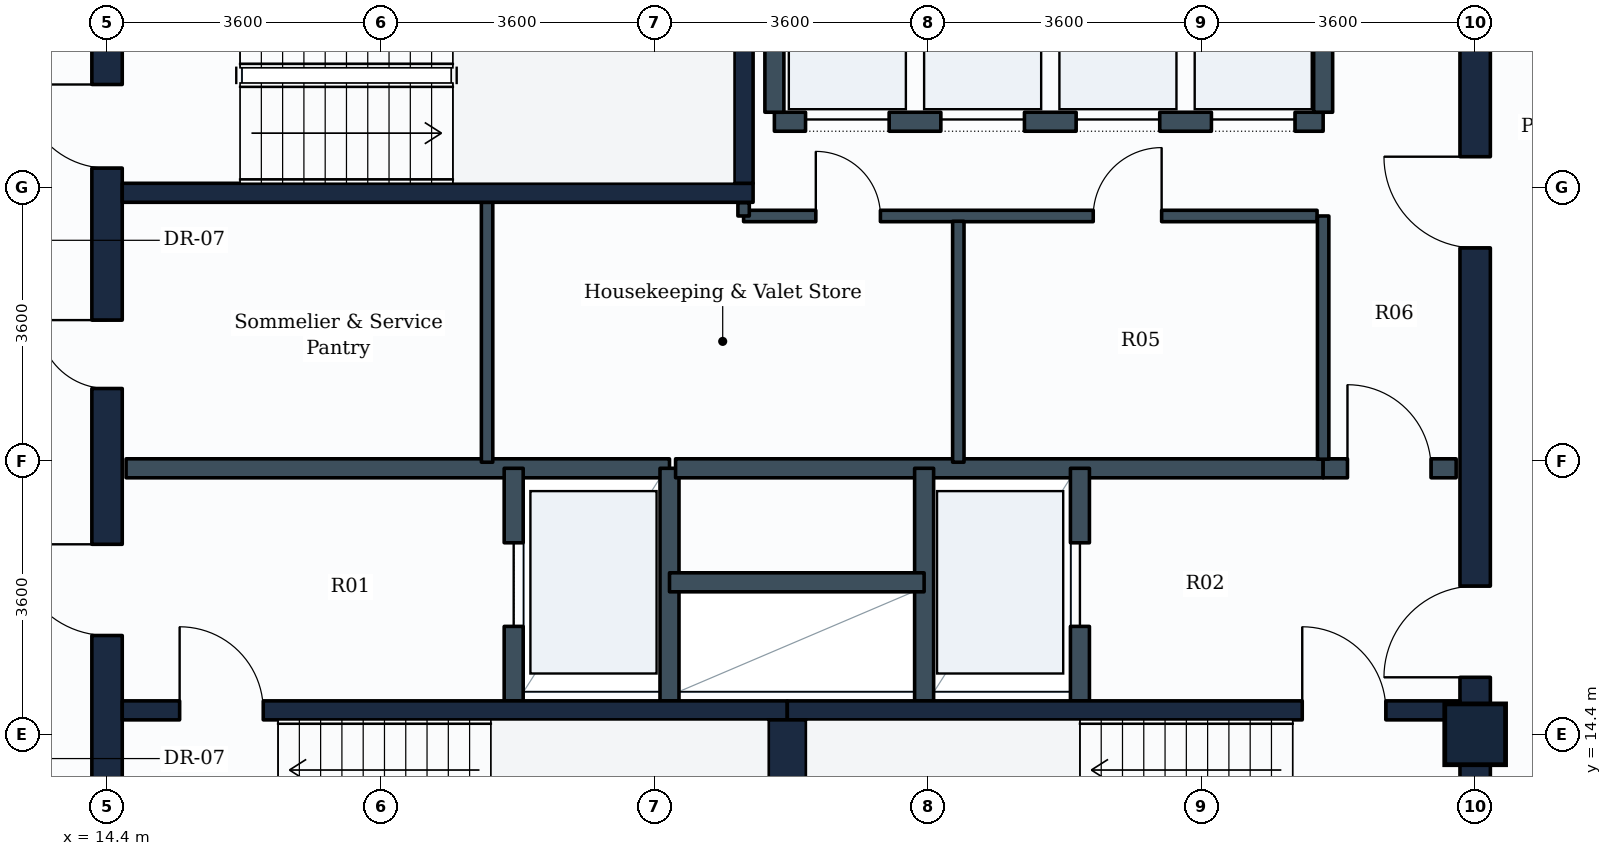
"""IFC4 building model, lengths in metres.
Left out: names, types, materials, properties, quantities, classifications, styles, units other than length and angle.
Written with IfcOpenShell. Run it as: python <this file> out.ifc"""

import sys

from ifc_helpers import new_model, si_unit, direction, frame, frame_2d, origin, origin_2d, place, context, subcontext, project, spatial, rectangle, extrude, element, fill, save


model = new_model("IFC4")
c1 = context("Model", 3, precision=1e-05, world=origin(), true_north=direction((0.0, 1.0)))
c2 = subcontext(c1, "Body", "Model", "MODEL_VIEW")
j1 = project(units=[si_unit("LENGTHUNIT", "METRE"), si_unit("PLANEANGLEUNIT", "RADIAN")], contexts=[c1])
p1 = place(None, origin())
s1 = spatial("IfcSite", under=j1, at=p1, CompositionType="ELEMENT")
p2 = place(p1, origin())
s2 = spatial("IfcBuilding", under=s1, at=p2, CompositionType="ELEMENT")
p3 = place(p2, frame((0.0, 0.0, 270.2)))
s3 = spatial("IfcBuildingStorey", under=s2, at=p3, CompositionType="ELEMENT", Elevation=270.2)
p4 = place(p3, frame((32.4, 14.4, 0.0), z_axis=(0.0, 0.0, 1.0), x_axis=(1.0, 0.0, 0.0)))
e1 = element("IfcColumn", 1, at=p4, inside=s3, PredefinedType="COLUMN", context=c2, shape_type="SweptSolid", body=[
    extrude(rectangle(XDim=0.8, YDim=0.8, at=origin_2d()), origin(), (0.0, 0.0, 1.0), 3.6),
])
p5 = place(p3, frame((14.4, 10.8, 0.0), z_axis=(0.0, 0.0, 1.0), x_axis=(0.0, 1.0, 0.0)))
e2 = element("IfcWall", 2, at=p5, inside=s3, PredefinedType="SHEAR", context=c2, shape_type="SweptSolid", body=[
    extrude(rectangle(XDim=14.4, YDim=0.4, at=frame_2d((7.2, 0.0))), origin(), (0.0, 0.0, 1.0), 3.35),
])
p6 = place(p5, frame((11.05, 0.0, 0.0)))
e3 = element("IfcOpeningElement", 3, at=p6, cuts=e2, PredefinedType="OPENING", context=c2, shape_type="SweptSolid", body=[
    extrude(rectangle(XDim=1.1, YDim=2.1, at=frame_2d((0.55, 1.05))), frame((0.0, 0.21, 0.0), z_axis=(0.0, -1.0, 0.0), x_axis=(1.0, 0.0, 0.0)), (0.0, 0.0, 1.0), 0.42),
])
p7 = place(p5, frame((4.9, 0.0, 0.0)))
e4 = element("IfcOpeningElement", 4, at=p7, cuts=e2, PredefinedType="OPENING", context=c2, shape_type="SweptSolid", body=[
    extrude(rectangle(XDim=1.2, YDim=2.1, at=frame_2d((0.6, 1.05))), frame((0.0, 0.21, 0.0), z_axis=(0.0, -1.0, 0.0), x_axis=(1.0, 0.0, 0.0)), (0.0, 0.0, 1.0), 0.42),
])
p8 = place(p5, frame((8.15, 0.0, 0.0)))
e5 = element("IfcOpeningElement", 5, at=p8, cuts=e2, PredefinedType="OPENING", context=c2, shape_type="SweptSolid", body=[
    extrude(rectangle(XDim=0.9, YDim=2.1, at=frame_2d((0.45, 1.05))), frame((0.0, 0.21, 0.0), z_axis=(0.0, -1.0, 0.0), x_axis=(1.0, 0.0, 0.0)), (0.0, 0.0, 1.0), 0.42),
])
p9 = place(p3, frame((32.4, 10.8, 0.0), z_axis=(0.0, 0.0, 1.0), x_axis=(0.0, 1.0, 0.0)))
e6 = element("IfcWall", 6, at=p9, inside=s3, PredefinedType="SHEAR", context=c2, shape_type="SweptSolid", body=[
    extrude(rectangle(XDim=14.4, YDim=0.4, at=frame_2d((7.2, 0.0))), origin(), (0.0, 0.0, 1.0), 3.35),
])
p10 = place(p9, frame((4.35, 0.0, 0.0)))
e7 = element("IfcOpeningElement", 7, at=p10, cuts=e6, PredefinedType="OPENING", context=c2, shape_type="SweptSolid", body=[
    extrude(rectangle(XDim=1.2, YDim=2.1, at=frame_2d((0.6, 1.05))), frame((0.0, 0.21, 0.0), z_axis=(0.0, -1.0, 0.0), x_axis=(1.0, 0.0, 0.0)), (0.0, 0.0, 1.0), 0.42),
])
p11 = place(p9, frame((10.0, 0.0, 0.0)))
e8 = element("IfcOpeningElement", 8, at=p11, cuts=e6, PredefinedType="OPENING", context=c2, shape_type="SweptSolid", body=[
    extrude(rectangle(XDim=1.2, YDim=2.1, at=frame_2d((0.6, 1.05))), frame((0.0, 0.21, 0.0), z_axis=(0.0, -1.0, 0.0), x_axis=(1.0, 0.0, 0.0)), (0.0, 0.0, 1.0), 0.42),
])
p12 = place(p3, frame((14.6, 14.715, 0.0), z_axis=(0.0, 0.0, 1.0), x_axis=(1.0, 0.0, 0.0)))
e9 = element("IfcWall", 9, at=p12, inside=s3, PredefinedType="SHEAR", context=c2, shape_type="SweptSolid", body=[
    extrude(rectangle(XDim=8.75, YDim=0.25, at=frame_2d((4.375, 0.0))), origin(), (0.0, 0.0, 1.0), 3.35),
])
p13 = place(p12, frame((0.755, 0.0, 0.0)))
e10 = element("IfcOpeningElement", 10, at=p13, cuts=e9, PredefinedType="OPENING", context=c2, shape_type="SweptSolid", body=[
    extrude(rectangle(XDim=1.1, YDim=2.1, at=frame_2d((0.55, 1.05))), frame((0.0, 0.135, 0.0), z_axis=(0.0, -1.0, 0.0), x_axis=(1.0, 0.0, 0.0)), (0.0, 0.0, 1.0), 0.27),
])
p14 = place(p3, frame((23.35, 14.715, 0.0), z_axis=(0.0, 0.0, 1.0), x_axis=(1.0, 0.0, 0.0)))
e11 = element("IfcWall", 11, at=p14, inside=s3, PredefinedType="SHEAR", context=c2, shape_type="SweptSolid", body=[
    extrude(rectangle(XDim=8.85, YDim=0.25, at=frame_2d((4.425, 0.0))), origin(), (0.0, 0.0, 1.0), 3.35),
])
p15 = place(p14, frame((6.775, 0.0, 0.0)))
e12 = element("IfcOpeningElement", 12, at=p15, cuts=e11, PredefinedType="OPENING", context=c2, shape_type="SweptSolid", body=[
    extrude(rectangle(XDim=1.1, YDim=2.1, at=frame_2d((0.55, 1.05))), frame((0.0, 0.135, 0.0), z_axis=(0.0, -1.0, 0.0), x_axis=(1.0, 0.0, 0.0)), (0.0, 0.0, 1.0), 0.27),
])
p16 = place(p3, frame((23.35, 11.75, 0.0), z_axis=(0.0, 0.0, 1.0), x_axis=(0.0, 1.0, 0.0)))
e13 = element("IfcWall", 13, at=p16, inside=s3, PredefinedType="SHEAR", context=c2, shape_type="SweptSolid", body=[
    extrude(rectangle(XDim=2.84, YDim=0.5, at=frame_2d((1.42, 0.0))), origin(), (0.0, 0.0, 1.0), 3.35),
])
p17 = place(p3, frame((14.6, 21.525, 0.0), z_axis=(0.0, 0.0, 1.0), x_axis=(1.0, 0.0, 0.0)))
e14 = element("IfcWall", 14, at=p17, inside=s3, PredefinedType="SHEAR", context=c2, shape_type="SweptSolid", body=[
    extrude(rectangle(XDim=8.3, YDim=0.25, at=frame_2d((4.15, 0.0))), origin(), (0.0, 0.0, 1.0), 3.35),
])
p18 = place(p3, frame((22.775, 21.65, 0.0), z_axis=(0.0, 0.0, 1.0), x_axis=(0.0, 1.0, 0.0)))
e15 = element("IfcWall", 15, at=p18, inside=s3, PredefinedType="SHEAR", context=c2, shape_type="SweptSolid", body=[
    extrude(rectangle(XDim=2.84, YDim=0.25, at=frame_2d((1.42, 0.0))), origin(), (0.0, 0.0, 1.0), 3.35),
])
p19 = place(p3, frame((14.65, 17.9, 0.0), z_axis=(0.0, 0.0, 1.0), x_axis=(1.0, 0.0, 0.0)))
e16 = element("IfcWall", 16, at=p19, inside=s3, PredefinedType="PARTITIONING", context=c2, shape_type="SweptSolid", body=[
    extrude(rectangle(XDim=7.15, YDim=0.25, at=frame_2d((3.575, 0.0))), origin(), (0.0, 0.0, 1.0), 3.335),
])
p20 = place(p3, frame((19.75, 14.84, 0.0), z_axis=(0.0, 0.0, 1.0), x_axis=(0.0, 1.0, 0.0)))
e17 = element("IfcWall", 17, at=p20, inside=s3, PredefinedType="PARTITIONING", context=c2, shape_type="SweptSolid", body=[
    extrude(rectangle(XDim=3.06, YDim=0.25, at=frame_2d((1.53, 0.0))), origin(), (0.0, 0.0, 1.0), 3.335),
])
p21 = place(p20, frame((0.98, 0.0, 0.0)))
e18 = element("IfcOpeningElement", 18, at=p21, cuts=e17, PredefinedType="OPENING", context=c2, shape_type="SweptSolid", body=[
    extrude(rectangle(XDim=1.1, YDim=2.1, at=frame_2d((0.55, 1.05))), frame((0.0, 0.135, 0.0), z_axis=(0.0, -1.0, 0.0), x_axis=(1.0, 0.0, 0.0)), (0.0, 0.0, 1.0), 0.27),
])
p22 = place(p3, frame((21.8, 14.84, 0.0), z_axis=(0.0, 0.0, 1.0), x_axis=(0.0, 1.0, 0.0)))
e19 = element("IfcWall", 19, at=p22, inside=s3, PredefinedType="PARTITIONING", context=c2, shape_type="SweptSolid", body=[
    extrude(rectangle(XDim=3.06, YDim=0.25, at=frame_2d((1.53, 0.0))), origin(), (0.0, 0.0, 1.0), 3.335),
])
p23 = place(p3, frame((21.88, 17.9, 0.0), z_axis=(0.0, 0.0, 1.0), x_axis=(1.0, 0.0, 0.0)))
e20 = element("IfcWall", 20, at=p23, inside=s3, PredefinedType="PARTITIONING", context=c2, shape_type="SweptSolid", body=[
    extrude(rectangle(XDim=8.52, YDim=0.25, at=frame_2d((4.26, 0.0))), origin(), (0.0, 0.0, 1.0), 3.335),
])
p24 = place(p3, frame((30.4, 17.9, 0.0), z_axis=(0.0, 0.0, 1.0), x_axis=(1.0, 0.0, 0.0)))
e21 = element("IfcWall", 21, at=p24, inside=s3, PredefinedType="PARTITIONING", context=c2, shape_type="SweptSolid", body=[
    extrude(rectangle(XDim=1.75, YDim=0.25, at=frame_2d((0.875, 0.0))), origin(), (0.0, 0.0, 1.0), 3.335),
])
p25 = place(p24, frame((0.32, 0.0, 0.0)))
e22 = element("IfcOpeningElement", 22, at=p25, cuts=e21, PredefinedType="OPENING", context=c2, shape_type="SweptSolid", body=[
    extrude(rectangle(XDim=1.1, YDim=2.1, at=frame_2d((0.55, 1.05))), frame((0.0, 0.135, 0.0), z_axis=(0.0, -1.0, 0.0), x_axis=(1.0, 0.0, 0.0)), (0.0, 0.0, 1.0), 0.27),
])
p26 = place(p3, frame((25.15, 14.84, 0.0), z_axis=(0.0, 0.0, 1.0), x_axis=(0.0, 1.0, 0.0)))
e23 = element("IfcWall", 23, at=p26, inside=s3, PredefinedType="PARTITIONING", context=c2, shape_type="SweptSolid", body=[
    extrude(rectangle(XDim=3.06, YDim=0.25, at=frame_2d((1.53, 0.0))), origin(), (0.0, 0.0, 1.0), 3.335),
])
p27 = place(p3, frame((27.2, 14.84, 0.0), z_axis=(0.0, 0.0, 1.0), x_axis=(0.0, 1.0, 0.0)))
e24 = element("IfcWall", 24, at=p27, inside=s3, PredefinedType="PARTITIONING", context=c2, shape_type="SweptSolid", body=[
    extrude(rectangle(XDim=3.06, YDim=0.25, at=frame_2d((1.53, 0.0))), origin(), (0.0, 0.0, 1.0), 3.335),
])
p28 = place(p27, frame((0.98, 0.0, 0.0)))
e25 = element("IfcOpeningElement", 25, at=p28, cuts=e24, PredefinedType="OPENING", context=c2, shape_type="SweptSolid", body=[
    extrude(rectangle(XDim=1.1, YDim=2.1, at=frame_2d((0.55, 1.05))), frame((0.0, 0.135, 0.0), z_axis=(0.0, -1.0, 0.0), x_axis=(1.0, 0.0, 0.0)), (0.0, 0.0, 1.0), 0.27),
])
p29 = place(p3, frame((21.8, 16.4, 0.0), z_axis=(0.0, 0.0, 1.0), x_axis=(1.0, 0.0, 0.0)))
e26 = element("IfcWall", 26, at=p29, inside=s3, PredefinedType="PARTITIONING", context=c2, shape_type="SweptSolid", body=[
    extrude(rectangle(XDim=3.35, YDim=0.25, at=frame_2d((1.675, 0.0))), origin(), (0.0, 0.0, 1.0), 3.335),
])
p30 = place(p3, frame((23.18, 22.46, 0.0), z_axis=(0.0, 0.0, 1.0), x_axis=(1.0, 0.0, 0.0)))
e27 = element("IfcWall", 27, at=p30, inside=s3, PredefinedType="PARTITIONING", context=c2, shape_type="SweptSolid", body=[
    extrude(rectangle(XDim=7.22, YDim=0.25, at=frame_2d((3.61, 0.0))), origin(), (0.0, 0.0, 1.0), 3.335),
])
p31 = place(p30, frame((0.41, 0.0, 0.0)))
e28 = element("IfcOpeningElement", 28, at=p31, cuts=e27, PredefinedType="OPENING", context=c2, shape_type="SweptSolid", body=[
    extrude(rectangle(XDim=1.1, YDim=2.1, at=frame_2d((0.55, 1.05))), frame((0.0, 0.135, 0.0), z_axis=(0.0, -1.0, 0.0), x_axis=(1.0, 0.0, 0.0)), (0.0, 0.0, 1.0), 0.27),
])
p32 = place(p30, frame((2.19, 0.0, 0.0)))
e29 = element("IfcOpeningElement", 29, at=p32, cuts=e27, PredefinedType="OPENING", context=c2, shape_type="SweptSolid", body=[
    extrude(rectangle(XDim=1.1, YDim=2.1, at=frame_2d((0.55, 1.05))), frame((0.0, 0.135, 0.0), z_axis=(0.0, -1.0, 0.0), x_axis=(1.0, 0.0, 0.0)), (0.0, 0.0, 1.0), 0.27),
])
p33 = place(p30, frame((3.97, 0.0, 0.0)))
e30 = element("IfcOpeningElement", 30, at=p33, cuts=e27, PredefinedType="OPENING", context=c2, shape_type="SweptSolid", body=[
    extrude(rectangle(XDim=1.1, YDim=2.1, at=frame_2d((0.55, 1.05))), frame((0.0, 0.135, 0.0), z_axis=(0.0, -1.0, 0.0), x_axis=(1.0, 0.0, 0.0)), (0.0, 0.0, 1.0), 0.27),
])
p34 = place(p30, frame((5.75, 0.0, 0.0)))
e31 = element("IfcOpeningElement", 31, at=p34, cuts=e27, PredefinedType="OPENING", context=c2, shape_type="SweptSolid", body=[
    extrude(rectangle(XDim=1.1, YDim=2.1, at=frame_2d((0.55, 1.05))), frame((0.0, 0.135, 0.0), z_axis=(0.0, -1.0, 0.0), x_axis=(1.0, 0.0, 0.0)), (0.0, 0.0, 1.0), 0.27),
])
for number, where, z_axis, x_axis in (
    (32, (23.18, 22.585, 0.0), (0.0, 0.0, 1.0), (0.0, 1.0, 0.0)),
    (33, (30.4, 22.585, 0.0), (0.0, 0.0, 1.0), (0.0, 1.0, 0.0)),
):
    element("IfcWall", number, at=place(p3, frame(where, z_axis=z_axis, x_axis=x_axis)), inside=s3, PredefinedType="PARTITIONING", context=c2, shape_type="SweptSolid", body=[
        extrude(rectangle(XDim=2.315, YDim=0.25, at=frame_2d((1.157, 0.0))), origin(), (0.0, 0.0, 1.0), 3.335),
    ])
p35 = place(p3, frame((22.775, 21.22, 0.0), z_axis=(0.0, 0.0, 1.0), x_axis=(1.0, 0.0, 0.0)))
e34 = element("IfcWall", 34, at=p35, inside=s3, PredefinedType="PARTITIONING", context=c2, shape_type="SweptSolid", body=[
    extrude(rectangle(XDim=7.545, YDim=0.15, at=frame_2d((3.772, 0.0))), origin(), (0.0, 0.0, 1.0), 3.335),
])
p36 = place(p35, frame((0.95, 0.0, 0.0)))
e35 = element("IfcOpeningElement", 35, at=p36, cuts=e34, PredefinedType="OPENING", context=c2, shape_type="SweptSolid", body=[
    extrude(rectangle(XDim=0.85, YDim=2.1, at=frame_2d((0.425, 1.05))), frame((0.0, 0.085, 0.0), z_axis=(0.0, -1.0, 0.0), x_axis=(1.0, 0.0, 0.0)), (0.0, 0.0, 1.0), 0.17),
])
p37 = place(p35, frame((4.6, 0.0, 0.0)))
e36 = element("IfcOpeningElement", 36, at=p37, cuts=e34, PredefinedType="OPENING", context=c2, shape_type="SweptSolid", body=[
    extrude(rectangle(XDim=0.9, YDim=2.1, at=frame_2d((0.45, 1.05))), frame((0.0, 0.085, 0.0), z_axis=(0.0, -1.0, 0.0), x_axis=(1.0, 0.0, 0.0)), (0.0, 0.0, 1.0), 0.17),
])
p38 = place(p3, frame((22.775, 21.22, 0.0), z_axis=(0.0, 0.0, 1.0), x_axis=(0.0, 1.0, 0.0)))
e37 = element("IfcWall", 37, at=p38, inside=s3, PredefinedType="PARTITIONING", context=c2, shape_type="SweptSolid", body=[
    extrude(rectangle(XDim=0.175, YDim=0.15, at=frame_2d((0.087, 0.0))), origin(), (0.0, 0.0, 1.0), 3.335),
])
p39 = place(p3, frame((30.4, 18.02, 0.0), z_axis=(0.0, 0.0, 1.0), x_axis=(0.0, 1.0, 0.0)))
e38 = element("IfcWall", 38, at=p39, inside=s3, PredefinedType="PARTITIONING", context=c2, shape_type="SweptSolid", body=[
    extrude(rectangle(XDim=3.2, YDim=0.15, at=frame_2d((1.6, 0.0))), origin(), (0.0, 0.0, 1.0), 3.335),
])
p40 = place(p3, frame((19.4, 17.98, 0.0), z_axis=(0.0, 0.0, 1.0), x_axis=(0.0, 1.0, 0.0)))
e39 = element("IfcWall", 39, at=p40, inside=s3, PredefinedType="PARTITIONING", context=c2, shape_type="SweptSolid", body=[
    extrude(rectangle(XDim=3.42, YDim=0.15, at=frame_2d((1.71, 0.0))), origin(), (0.0, 0.0, 1.0), 3.335),
])
p41 = place(p3, frame((25.6, 17.98, 0.0), z_axis=(0.0, 0.0, 1.0), x_axis=(0.0, 1.0, 0.0)))
e40 = element("IfcWall", 40, at=p41, inside=s3, PredefinedType="PARTITIONING", context=c2, shape_type="SweptSolid", body=[
    extrude(rectangle(XDim=3.17, YDim=0.15, at=frame_2d((1.585, 0.0))), origin(), (0.0, 0.0, 1.0), 3.335),
])
p42 = place(p13, origin())
e41 = element("IfcDoor", 41, at=p42, inside=s3, OperationType="SINGLE_SWING_LEFT", PredefinedType="DOOR", context=c2, shape_type="SweptSolid", body=[
    extrude(rectangle(XDim=1.1, YDim=2.1, at=frame_2d((0.55, 1.05))), frame((0.0, 0.025, 0.0), z_axis=(0.0, -1.0, 0.0), x_axis=(1.0, 0.0, 0.0)), (0.0, 0.0, 1.0), 0.05),
])
fill(e10, e41)
p43 = place(p15, origin())
e42 = element("IfcDoor", 42, at=p43, inside=s3, OperationType="SINGLE_SWING_LEFT", PredefinedType="DOOR", context=c2, shape_type="SweptSolid", body=[
    extrude(rectangle(XDim=1.1, YDim=2.1, at=frame_2d((0.55, 1.05))), frame((0.0, 0.025, 0.0), z_axis=(0.0, -1.0, 0.0), x_axis=(1.0, 0.0, 0.0)), (0.0, 0.0, 1.0), 0.05),
])
fill(e12, e42)
p44 = place(p6, origin())
e43 = element("IfcDoor", 43, at=p44, inside=s3, OperationType="SINGLE_SWING_RIGHT", PredefinedType="DOOR", context=c2, shape_type="SweptSolid", body=[
    extrude(rectangle(XDim=1.1, YDim=2.1, at=frame_2d((0.55, 1.05))), frame((0.0, 0.025, 0.0), z_axis=(0.0, -1.0, 0.0), x_axis=(1.0, 0.0, 0.0)), (0.0, 0.0, 1.0), 0.05),
])
fill(e3, e43)
p45 = place(p21, origin())
e44 = element("IfcDoor", 44, at=p45, inside=s3, OperationType="SLIDING_TO_LEFT", PredefinedType="DOOR", context=c2, shape_type="SweptSolid", body=[
    extrude(rectangle(XDim=1.1, YDim=2.1, at=frame_2d((0.55, 1.05))), frame((0.0, 0.025, 0.0), z_axis=(0.0, -1.0, 0.0), x_axis=(1.0, 0.0, 0.0)), (0.0, 0.0, 1.0), 0.05),
])
fill(e18, e44)
p46 = place(p28, origin())
e45 = element("IfcDoor", 45, at=p46, inside=s3, OperationType="SLIDING_TO_LEFT", PredefinedType="DOOR", context=c2, shape_type="SweptSolid", body=[
    extrude(rectangle(XDim=1.1, YDim=2.1, at=frame_2d((0.55, 1.05))), frame((0.0, 0.025, 0.0), z_axis=(0.0, -1.0, 0.0), x_axis=(1.0, 0.0, 0.0)), (0.0, 0.0, 1.0), 0.05),
])
fill(e25, e45)
p47 = place(p7, origin())
e46 = element("IfcDoor", 46, at=p47, inside=s3, OperationType="SINGLE_SWING_RIGHT", PredefinedType="DOOR", context=c2, shape_type="SweptSolid", body=[
    extrude(rectangle(XDim=1.2, YDim=2.1, at=frame_2d((0.6, 1.05))), frame((0.0, 0.025, 0.0), z_axis=(0.0, -1.0, 0.0), x_axis=(1.0, 0.0, 0.0)), (0.0, 0.0, 1.0), 0.05),
])
fill(e4, e46)
p48 = place(p10, origin())
e47 = element("IfcDoor", 47, at=p48, inside=s3, OperationType="SINGLE_SWING_LEFT", PredefinedType="DOOR", context=c2, shape_type="SweptSolid", body=[
    extrude(rectangle(XDim=1.2, YDim=2.1, at=frame_2d((0.6, 1.05))), frame((0.0, 0.025, 0.0), z_axis=(0.0, -1.0, 0.0), x_axis=(1.0, 0.0, 0.0)), (0.0, 0.0, 1.0), 0.05),
])
fill(e7, e47)
p49 = place(p25, origin())
e48 = element("IfcDoor", 48, at=p49, inside=s3, OperationType="SINGLE_SWING_LEFT", PredefinedType="DOOR", context=c2, shape_type="SweptSolid", body=[
    extrude(rectangle(XDim=1.1, YDim=2.1, at=frame_2d((0.55, 1.05))), frame((0.0, 0.025, 0.0), z_axis=(0.0, -1.0, 0.0), x_axis=(1.0, 0.0, 0.0)), (0.0, 0.0, 1.0), 0.05),
])
fill(e22, e48)
p50 = place(p31, origin())
e49 = element("IfcDoor", 49, at=p50, inside=s3, OperationType="SLIDING_TO_LEFT", PredefinedType="DOOR", context=c2, shape_type="SweptSolid", body=[
    extrude(rectangle(XDim=1.1, YDim=2.1, at=frame_2d((0.55, 1.05))), frame((0.0, 0.025, 0.0), z_axis=(0.0, -1.0, 0.0), x_axis=(1.0, 0.0, 0.0)), (0.0, 0.0, 1.0), 0.05),
])
fill(e28, e49)
p51 = place(p32, origin())
e50 = element("IfcDoor", 50, at=p51, inside=s3, OperationType="SLIDING_TO_LEFT", PredefinedType="DOOR", context=c2, shape_type="SweptSolid", body=[
    extrude(rectangle(XDim=1.1, YDim=2.1, at=frame_2d((0.55, 1.05))), frame((0.0, 0.025, 0.0), z_axis=(0.0, -1.0, 0.0), x_axis=(1.0, 0.0, 0.0)), (0.0, 0.0, 1.0), 0.05),
])
fill(e29, e50)
p52 = place(p33, origin())
e51 = element("IfcDoor", 51, at=p52, inside=s3, OperationType="SLIDING_TO_LEFT", PredefinedType="DOOR", context=c2, shape_type="SweptSolid", body=[
    extrude(rectangle(XDim=1.1, YDim=2.1, at=frame_2d((0.55, 1.05))), frame((0.0, 0.025, 0.0), z_axis=(0.0, -1.0, 0.0), x_axis=(1.0, 0.0, 0.0)), (0.0, 0.0, 1.0), 0.05),
])
fill(e30, e51)
p53 = place(p34, origin())
e52 = element("IfcDoor", 52, at=p53, inside=s3, OperationType="SLIDING_TO_LEFT", PredefinedType="DOOR", context=c2, shape_type="SweptSolid", body=[
    extrude(rectangle(XDim=1.1, YDim=2.1, at=frame_2d((0.55, 1.05))), frame((0.0, 0.025, 0.0), z_axis=(0.0, -1.0, 0.0), x_axis=(1.0, 0.0, 0.0)), (0.0, 0.0, 1.0), 0.05),
])
fill(e31, e52)
p54 = place(p11, origin())
e53 = element("IfcDoor", 53, at=p54, inside=s3, OperationType="SINGLE_SWING_RIGHT", PredefinedType="DOOR", context=c2, shape_type="SweptSolid", body=[
    extrude(rectangle(XDim=1.2, YDim=2.1, at=frame_2d((0.6, 1.05))), frame((0.0, 0.025, 0.0), z_axis=(0.0, -1.0, 0.0), x_axis=(1.0, 0.0, 0.0)), (0.0, 0.0, 1.0), 0.05),
])
fill(e8, e53)
p55 = place(p8, origin())
e54 = element("IfcDoor", 54, at=p55, inside=s3, OperationType="SINGLE_SWING_RIGHT", PredefinedType="DOOR", context=c2, shape_type="SweptSolid", body=[
    extrude(rectangle(XDim=0.9, YDim=2.1, at=frame_2d((0.45, 1.05))), frame((0.0, 0.025, 0.0), z_axis=(0.0, -1.0, 0.0), x_axis=(1.0, 0.0, 0.0)), (0.0, 0.0, 1.0), 0.05),
])
fill(e5, e54)
p56 = place(p36, origin())
e55 = element("IfcDoor", 55, at=p56, inside=s3, OperationType="SINGLE_SWING_LEFT", PredefinedType="DOOR", context=c2, shape_type="SweptSolid", body=[
    extrude(rectangle(XDim=0.85, YDim=2.1, at=frame_2d((0.425, 1.05))), frame((0.0, 0.025, 0.0), z_axis=(0.0, -1.0, 0.0), x_axis=(1.0, 0.0, 0.0)), (0.0, 0.0, 1.0), 0.05),
])
fill(e35, e55)
p57 = place(p37, origin())
e56 = element("IfcDoor", 56, at=p57, inside=s3, OperationType="SINGLE_SWING_RIGHT", PredefinedType="DOOR", context=c2, shape_type="SweptSolid", body=[
    extrude(rectangle(XDim=0.9, YDim=2.1, at=frame_2d((0.45, 1.05))), frame((0.0, 0.025, 0.0), z_axis=(0.0, -1.0, 0.0), x_axis=(1.0, 0.0, 0.0)), (0.0, 0.0, 1.0), 0.05),
])
fill(e36, e56)
save(model, sys.argv[1])
